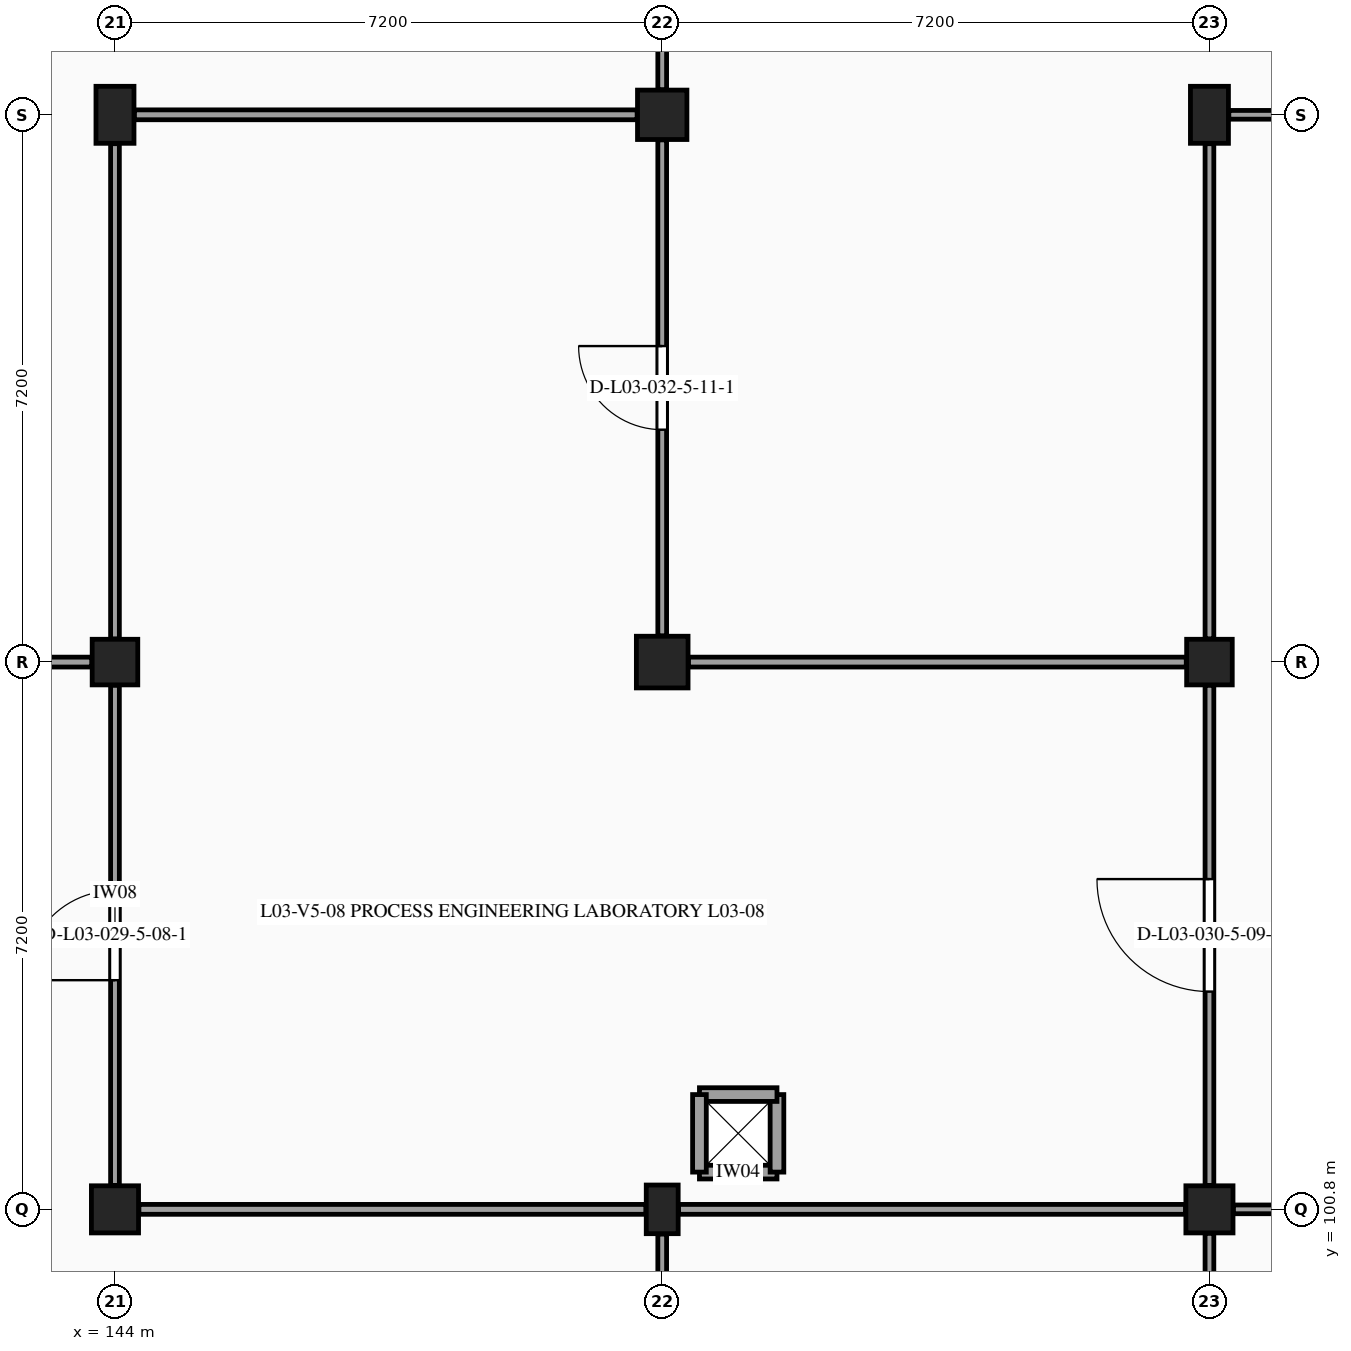
"""IFC4 building model, lengths in metres.
Left out: names, types, materials, properties, quantities, classifications, styles, units other than length and angle.
Written with IfcOpenShell. Run it as: python <this file> out.ifc"""

import sys

from ifc_helpers import new_model, si_unit, direction, frame, frame_2d, origin, origin_2d, place, context, subcontext, project, spatial, rectangle, extrude, element, fill, save


model = new_model("IFC4")
c1 = context("Model", 3, precision=1e-05, world=origin(), true_north=direction((0.0, 1.0)))
c2 = subcontext(c1, "Body", "Model", "MODEL_VIEW")
j1 = project(units=[si_unit("LENGTHUNIT", "METRE"), si_unit("PLANEANGLEUNIT", "RADIAN")], contexts=[c1])
p1 = place(None, origin())
s1 = spatial("IfcSite", under=j1, at=p1, CompositionType="ELEMENT")
p2 = place(p1, origin())
s2 = spatial("IfcBuilding", under=s1, at=p2, CompositionType="ELEMENT")
p3 = place(p2, frame((0.0, 0.0, 14.4)))
s3 = spatial("IfcBuildingStorey", under=s2, at=p3, CompositionType="ELEMENT", Elevation=14.4)
p4 = place(p3, frame((144.0, 100.8, 0.0), z_axis=(0.0, 0.0, 1.0), x_axis=(1.0, 0.0, 0.0)))
e1 = element("IfcColumn", 1, at=p4, inside=s3, PredefinedType="COLUMN", context=c2, shape_type="SweptSolid", body=[
    extrude(rectangle(XDim=0.62, YDim=0.62, at=origin_2d()), origin(), (0.0, 0.0, 1.0), 4.2),
])
p5 = place(p3, frame((144.0, 108.0, 0.0), z_axis=(0.0, 0.0, 1.0), x_axis=(1.0, 0.0, 0.0)))
e2 = element("IfcColumn", 2, at=p5, inside=s3, PredefinedType="COLUMN", context=c2, shape_type="SweptSolid", body=[
    extrude(rectangle(XDim=0.6, YDim=0.6, at=origin_2d()), origin(), (0.0, 0.0, 1.0), 4.2),
])
p6 = place(p3, frame((144.0, 115.2, 0.0), z_axis=(0.0, 0.0, 1.0), x_axis=(1.0, 0.0, 0.0)))
e3 = element("IfcColumn", 3, at=p6, inside=s3, PredefinedType="COLUMN", context=c2, shape_type="SweptSolid", body=[
    extrude(rectangle(XDim=0.5, YDim=0.75, at=origin_2d()), origin(), (0.0, 0.0, 1.0), 4.2),
])
p7 = place(p3, frame((151.2, 100.8, 0.0), z_axis=(0.0, 0.0, 1.0), x_axis=(1.0, 0.0, 0.0)))
e4 = element("IfcColumn", 4, at=p7, inside=s3, PredefinedType="PILASTER", context=c2, shape_type="SweptSolid", body=[
    extrude(rectangle(XDim=0.42, YDim=0.64, at=origin_2d()), origin(), (0.0, 0.0, 1.0), 4.2),
])
p8 = place(p3, frame((151.2, 108.0, 0.0), z_axis=(0.0, 0.0, 1.0), x_axis=(1.0, 0.0, 0.0)))
e5 = element("IfcColumn", 5, at=p8, inside=s3, PredefinedType="COLUMN", context=c2, shape_type="SweptSolid", body=[
    extrude(rectangle(XDim=0.68, YDim=0.68, at=origin_2d()), origin(), (0.0, 0.0, 1.0), 4.2),
])
p9 = place(p3, frame((151.2, 115.2, 0.0), z_axis=(0.0, 0.0, 1.0), x_axis=(1.0, 0.0, 0.0)))
e6 = element("IfcColumn", 6, at=p9, inside=s3, PredefinedType="COLUMN", context=c2, shape_type="SweptSolid", body=[
    extrude(rectangle(XDim=0.65, YDim=0.65, at=origin_2d()), origin(), (0.0, 0.0, 1.0), 4.2),
])
p10 = place(p3, frame((158.4, 100.8, 0.0), z_axis=(0.0, 0.0, 1.0), x_axis=(1.0, 0.0, 0.0)))
e7 = element("IfcColumn", 7, at=p10, inside=s3, PredefinedType="COLUMN", context=c2, shape_type="SweptSolid", body=[
    extrude(rectangle(XDim=0.62, YDim=0.62, at=origin_2d()), origin(), (0.0, 0.0, 1.0), 4.2),
])
p11 = place(p3, frame((158.4, 108.0, 0.0), z_axis=(0.0, 0.0, 1.0), x_axis=(1.0, 0.0, 0.0)))
e8 = element("IfcColumn", 8, at=p11, inside=s3, PredefinedType="COLUMN", context=c2, shape_type="SweptSolid", body=[
    extrude(rectangle(XDim=0.6, YDim=0.6, at=origin_2d()), origin(), (0.0, 0.0, 1.0), 4.2),
])
p12 = place(p3, frame((158.4, 115.2, 0.0), z_axis=(0.0, 0.0, 1.0), x_axis=(1.0, 0.0, 0.0)))
e9 = element("IfcColumn", 9, at=p12, inside=s3, PredefinedType="COLUMN", context=c2, shape_type="SweptSolid", body=[
    extrude(rectangle(XDim=0.5, YDim=0.75, at=origin_2d()), origin(), (0.0, 0.0, 1.0), 4.2),
])
for number, where, z_axis, x_axis in (
    (10, (151.69, 101.29, 0.0), (0.0, 0.0, 1.0), (1.0, 0.0, 0.0)),
    (11, (152.71, 101.29, 0.0), (0.0, 0.0, 1.0), (0.0, 1.0, 0.0)),
    (12, (152.71, 102.31, 0.0), (0.0, 0.0, 1.0), (-1.0, 0.0, 0.0)),
    (13, (151.69, 102.31, 0.0), (0.0, 0.0, 1.0), (0.0, -1.0, 0.0)),
):
    element("IfcWall", number, at=place(p3, frame(where, z_axis=z_axis, x_axis=x_axis)), inside=s3, PredefinedType="PARTITIONING", context=c2, shape_type="SweptSolid", body=[
        extrude(rectangle(XDim=1.02, YDim=0.18, at=frame_2d((0.51, 0.0))), origin(), (0.0, 0.0, 1.0), 3.94),
    ])
p13 = place(p3, frame((144.0, 101.115, 0.0), z_axis=(0.0, 0.0, 1.0), x_axis=(0.0, 1.0, 0.0)))
e14 = element("IfcWall", 14, at=p13, inside=s3, PredefinedType="PARTITIONING", context=c2, shape_type="SweptSolid", body=[
    extrude(rectangle(XDim=6.58, YDim=0.115, at=frame_2d((3.29, 0.0))), origin(), (0.0, 0.0, 1.0), 3.25),
])
p14 = place(p13, frame((2.7, 0.0, 0.0)))
e15 = element("IfcOpeningElement", 15, at=p14, cuts=e14, PredefinedType="OPENING", context=c2, shape_type="SweptSolid", body=[
    extrude(rectangle(XDim=1.18, YDim=2.18, at=frame_2d((0.59, 1.09))), frame((0.0, 0.067, 0.0), z_axis=(0.0, -1.0, 0.0), x_axis=(1.0, 0.0, 0.0)), (0.0, 0.0, 1.0), 0.135),
])
p15 = place(p3, frame((137.145, 108.0, 0.0), z_axis=(0.0, 0.0, 1.0), x_axis=(1.0, 0.0, 0.0)))
e16 = element("IfcWall", 16, at=p15, inside=s3, PredefinedType="PARTITIONING", context=c2, shape_type="SweptSolid", body=[
    extrude(rectangle(XDim=6.55, YDim=0.13, at=frame_2d((3.275, 0.0))), origin(), (0.0, 0.0, 1.0), 3.2),
])
p16 = place(p3, frame((144.0, 108.305, 0.0), z_axis=(0.0, 0.0, 1.0), x_axis=(0.0, 1.0, 0.0)))
e17 = element("IfcWall", 17, at=p16, inside=s3, PredefinedType="PARTITIONING", context=c2, shape_type="SweptSolid", body=[
    extrude(rectangle(XDim=6.515, YDim=0.115, at=frame_2d((3.258, 0.0))), origin(), (0.0, 0.0, 1.0), 3.245),
])
p17 = place(p3, frame((151.2, 93.98, 0.0), z_axis=(0.0, 0.0, 1.0), x_axis=(0.0, 1.0, 0.0)))
e18 = element("IfcWall", 18, at=p17, inside=s3, PredefinedType="PARTITIONING", context=c2, shape_type="SweptSolid", body=[
    extrude(rectangle(XDim=6.495, YDim=0.115, at=frame_2d((3.248, 0.0))), origin(), (0.0, 0.0, 1.0), 3.255),
])
p18 = place(p3, frame((144.315, 100.8, 0.0), z_axis=(0.0, 0.0, 1.0), x_axis=(1.0, 0.0, 0.0)))
e19 = element("IfcWall", 19, at=p18, inside=s3, PredefinedType="PARTITIONING", context=c2, shape_type="SweptSolid", body=[
    extrude(rectangle(XDim=6.67, YDim=0.13, at=frame_2d((3.335, 0.0))), origin(), (0.0, 0.0, 1.0), 3.215),
])
p19 = place(p3, frame((151.2, 108.345, 0.0), z_axis=(0.0, 0.0, 1.0), x_axis=(0.0, 1.0, 0.0)))
e20 = element("IfcWall", 20, at=p19, inside=s3, PredefinedType="PARTITIONING", context=c2, shape_type="SweptSolid", body=[
    extrude(rectangle(XDim=6.525, YDim=0.115, at=frame_2d((3.263, 0.0))), origin(), (0.0, 0.0, 1.0), 3.245),
])
p20 = place(p19, frame((2.712, 0.0, 0.0)))
e21 = element("IfcOpeningElement", 21, at=p20, cuts=e20, PredefinedType="OPENING", context=c2, shape_type="SweptSolid", body=[
    extrude(rectangle(XDim=1.1, YDim=2.15, at=frame_2d((0.55, 1.075))), frame((0.0, 0.067, 0.0), z_axis=(0.0, -1.0, 0.0), x_axis=(1.0, 0.0, 0.0)), (0.0, 0.0, 1.0), 0.135),
])
p21 = place(p3, frame((144.255, 115.2, 0.0), z_axis=(0.0, 0.0, 1.0), x_axis=(1.0, 0.0, 0.0)))
e22 = element("IfcWall", 22, at=p21, inside=s3, PredefinedType="PARTITIONING", context=c2, shape_type="SweptSolid", body=[
    extrude(rectangle(XDim=6.615, YDim=0.13, at=frame_2d((3.308, 0.0))), origin(), (0.0, 0.0, 1.0), 3.215),
])
p22 = place(p3, frame((151.2, 115.53, 0.0), z_axis=(0.0, 0.0, 1.0), x_axis=(0.0, 1.0, 0.0)))
e23 = element("IfcWall", 23, at=p22, inside=s3, PredefinedType="PARTITIONING", context=c2, shape_type="SweptSolid", body=[
    extrude(rectangle(XDim=6.555, YDim=0.115, at=frame_2d((3.277, 0.0))), origin(), (0.0, 0.0, 1.0), 3.245),
])
p23 = place(p3, frame((158.4, 93.93, 0.0), z_axis=(0.0, 0.0, 1.0), x_axis=(0.0, 1.0, 0.0)))
e24 = element("IfcWall", 24, at=p23, inside=s3, PredefinedType="PARTITIONING", context=c2, shape_type="SweptSolid", body=[
    extrude(rectangle(XDim=6.555, YDim=0.115, at=frame_2d((3.278, 0.0))), origin(), (0.0, 0.0, 1.0), 3.255),
])
p24 = place(p23, frame((2.498, 0.0, 0.0)))
e25 = element("IfcOpeningElement", 25, at=p24, cuts=e24, PredefinedType="OPENING", context=c2, shape_type="SweptSolid", body=[
    extrude(rectangle(XDim=1.56, YDim=2.25, at=frame_2d((0.78, 1.125))), frame((0.0, 0.067, 0.0), z_axis=(0.0, -1.0, 0.0), x_axis=(1.0, 0.0, 0.0)), (0.0, 0.0, 1.0), 0.135),
])
p25 = place(p3, frame((151.415, 100.8, 0.0), z_axis=(0.0, 0.0, 1.0), x_axis=(1.0, 0.0, 0.0)))
e26 = element("IfcWall", 26, at=p25, inside=s3, PredefinedType="PARTITIONING", context=c2, shape_type="SweptSolid", body=[
    extrude(rectangle(XDim=6.67, YDim=0.13, at=frame_2d((3.335, 0.0))), origin(), (0.0, 0.0, 1.0), 3.22),
])
p26 = place(p3, frame((158.4, 101.115, 0.0), z_axis=(0.0, 0.0, 1.0), x_axis=(0.0, 1.0, 0.0)))
e27 = element("IfcWall", 27, at=p26, inside=s3, PredefinedType="PARTITIONING", context=c2, shape_type="SweptSolid", body=[
    extrude(rectangle(XDim=6.58, YDim=0.115, at=frame_2d((3.29, 0.0))), origin(), (0.0, 0.0, 1.0), 3.25),
])
p27 = place(p26, frame((2.55, 0.0, 0.0)))
e28 = element("IfcOpeningElement", 28, at=p27, cuts=e27, PredefinedType="OPENING", context=c2, shape_type="SweptSolid", body=[
    extrude(rectangle(XDim=1.48, YDim=2.28, at=frame_2d((0.74, 1.14))), frame((0.0, 0.067, 0.0), z_axis=(0.0, -1.0, 0.0), x_axis=(1.0, 0.0, 0.0)), (0.0, 0.0, 1.0), 0.135),
])
p28 = place(p3, frame((151.545, 108.0, 0.0), z_axis=(0.0, 0.0, 1.0), x_axis=(1.0, 0.0, 0.0)))
e29 = element("IfcWall", 29, at=p28, inside=s3, PredefinedType="PARTITIONING", context=c2, shape_type="SweptSolid", body=[
    extrude(rectangle(XDim=6.55, YDim=0.13, at=frame_2d((3.275, 0.0))), origin(), (0.0, 0.0, 1.0), 3.22),
])
p29 = place(p3, frame((158.4, 108.305, 0.0), z_axis=(0.0, 0.0, 1.0), x_axis=(0.0, 1.0, 0.0)))
e30 = element("IfcWall", 30, at=p29, inside=s3, PredefinedType="PARTITIONING", context=c2, shape_type="SweptSolid", body=[
    extrude(rectangle(XDim=6.515, YDim=0.115, at=frame_2d((3.258, 0.0))), origin(), (0.0, 0.0, 1.0), 3.245),
])
p30 = place(p3, frame((158.715, 100.8, 0.0), z_axis=(0.0, 0.0, 1.0), x_axis=(1.0, 0.0, 0.0)))
e31 = element("IfcWall", 31, at=p30, inside=s3, PredefinedType="PARTITIONING", context=c2, shape_type="SweptSolid", body=[
    extrude(rectangle(XDim=6.67, YDim=0.115, at=frame_2d((3.335, 0.0))), origin(), (0.0, 0.0, 1.0), 3.24),
])
p31 = place(p3, frame((158.655, 115.2, 0.0), z_axis=(0.0, 0.0, 1.0), x_axis=(1.0, 0.0, 0.0)))
e32 = element("IfcWall", 32, at=p31, inside=s3, PredefinedType="PARTITIONING", context=c2, shape_type="SweptSolid", body=[
    extrude(rectangle(XDim=6.615, YDim=0.115, at=frame_2d((3.308, 0.0))), origin(), (0.0, 0.0, 1.0), 3.24),
])
p32 = place(p14, origin())
e33 = element("IfcDoor", 33, at=p32, inside=s3, OperationType="SINGLE_SWING_LEFT", PredefinedType="DOOR", context=c2, shape_type="SweptSolid", body=[
    extrude(rectangle(XDim=1.18, YDim=2.18, at=frame_2d((0.59, 1.09))), frame((0.0, 0.025, 0.0), z_axis=(0.0, -1.0, 0.0), x_axis=(1.0, 0.0, 0.0)), (0.0, 0.0, 1.0), 0.05),
])
fill(e15, e33)
p33 = place(p27, origin())
e34 = element("IfcDoor", 34, at=p33, inside=s3, OperationType="SINGLE_SWING_RIGHT", PredefinedType="DOOR", context=c2, shape_type="SweptSolid", body=[
    extrude(rectangle(XDim=1.48, YDim=2.28, at=frame_2d((0.74, 1.14))), frame((0.0, 0.025, 0.0), z_axis=(0.0, -1.0, 0.0), x_axis=(1.0, 0.0, 0.0)), (0.0, 0.0, 1.0), 0.05),
])
fill(e28, e34)
p34 = place(p20, origin())
e35 = element("IfcDoor", 35, at=p34, inside=s3, OperationType="SINGLE_SWING_RIGHT", PredefinedType="DOOR", context=c2, shape_type="SweptSolid", body=[
    extrude(rectangle(XDim=1.1, YDim=2.15, at=frame_2d((0.55, 1.075))), frame((0.0, 0.025, 0.0), z_axis=(0.0, -1.0, 0.0), x_axis=(1.0, 0.0, 0.0)), (0.0, 0.0, 1.0), 0.05),
])
fill(e21, e35)
save(model, sys.argv[1])
